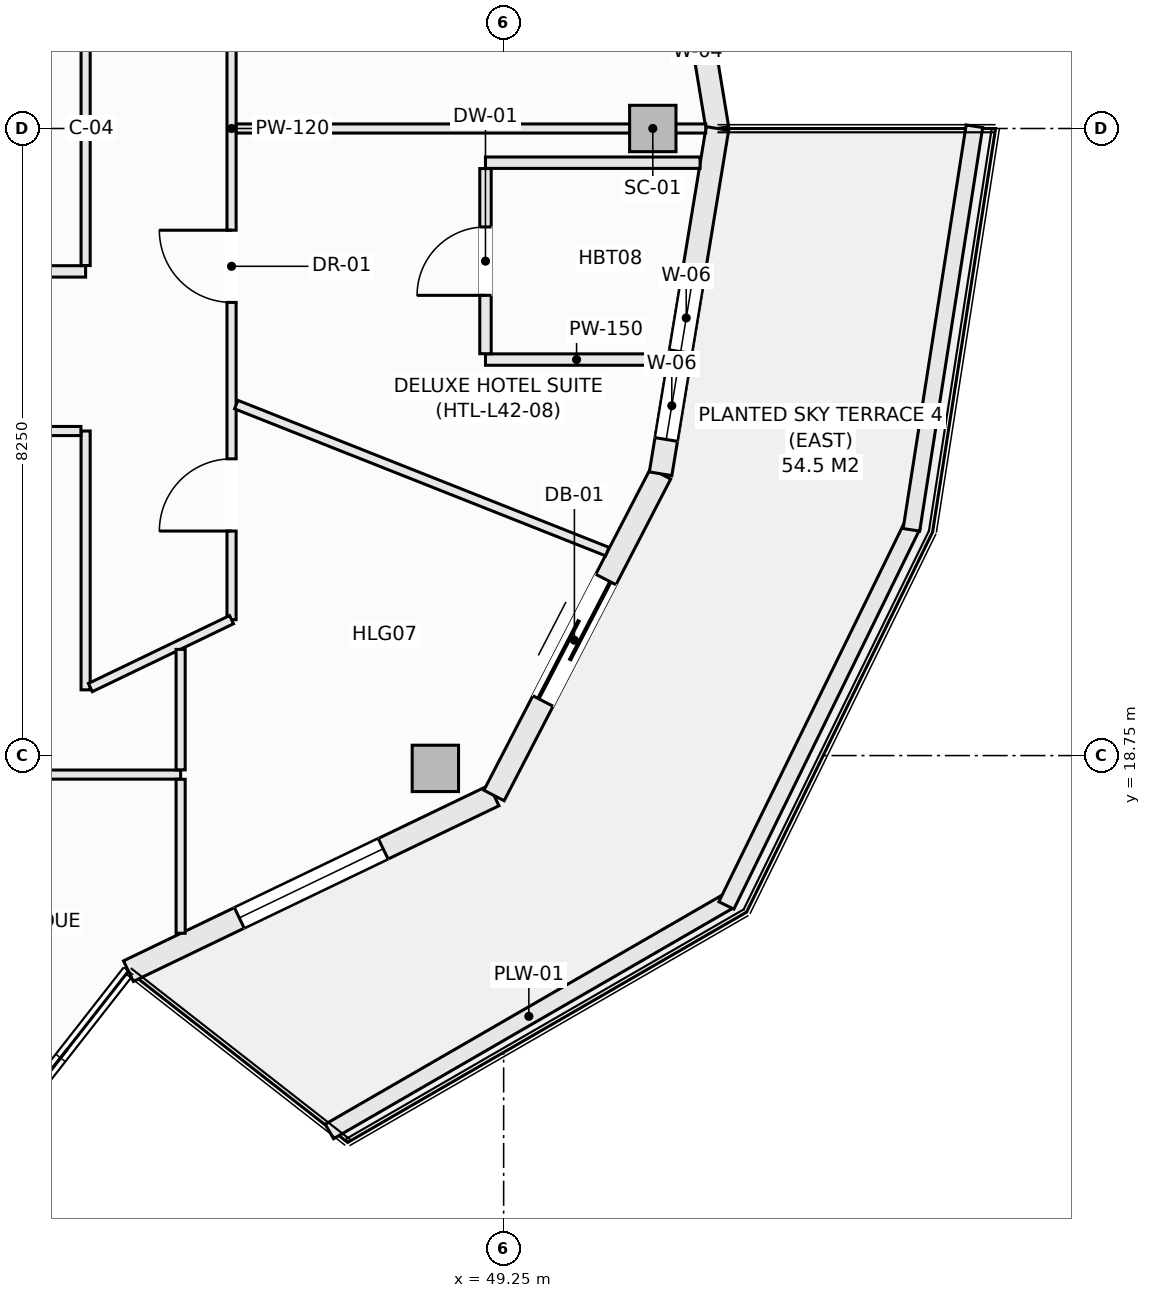
"""IFC4 building model, lengths in metres.
Left out: names, types, materials, properties, quantities, classifications, styles, units other than length and angle.
Written with IfcOpenShell. Run it as: python <this file> out.ifc"""

import sys

from ifc_helpers import new_model, si_unit, direction, frame, frame_2d, origin, origin_2d, place, context, subcontext, project, spatial, rectangle, hollow_rectangle, extrude, element, fill, save


model = new_model("IFC4")
c1 = context("Model", 3, precision=1e-05, world=origin(), true_north=direction((0.0, 1.0)))
c2 = subcontext(c1, "Body", "Model", "MODEL_VIEW")
j1 = project(units=[si_unit("LENGTHUNIT", "METRE"), si_unit("PLANEANGLEUNIT", "RADIAN")], contexts=[c1])
p1 = place(None, origin())
s1 = spatial("IfcSite", under=j1, at=p1, CompositionType="ELEMENT")
p2 = place(p1, origin())
s2 = spatial("IfcBuilding", under=s1, at=p2, CompositionType="ELEMENT")
p3 = place(p2, frame((0.0, 0.0, 163.1)))
s3 = spatial("IfcBuildingStorey", under=s2, at=p3, CompositionType="ELEMENT", Elevation=163.1)
for number, where, z_axis, x_axis in (
    (1, (51.212, 27.0, -0.27), (0.0, 0.0, 1.0), (1.0, 0.0, 0.0)),
    (2, (48.352, 18.581, -0.27), (0.0, 0.0, 1.0), (1.0, 0.0, 0.0)),
):
    element("IfcColumn", number, at=place(p3, frame(where, z_axis=z_axis, x_axis=x_axis)), inside=s3, PredefinedType="COLUMN", context=c2, shape_type="SweptSolid", body=[
        extrude(hollow_rectangle(XDim=0.61, YDim=0.61, WallThickness=0.025, at=origin_2d()), origin(), (0.0, 0.0, 1.0), 3.4),
    ])
p4 = place(p3, frame((51.315, 31.542, 0.0), z_axis=(0.0, 0.0, 1.0), x_axis=(0.162394765401, -0.986725868806, 0.0)))
e3 = element("IfcWall", 3, at=p4, inside=s3, PredefinedType="SOLIDWALL", context=c2, shape_type="SweptSolid", body=[
    extrude(rectangle(XDim=4.603, YDim=0.3, at=frame_2d((2.302, 0.0))), origin(), (0.0, 0.0, 1.0), 2.653),
])
p5 = place(p4, frame((0.958, 0.0, 0.74)))
e4 = element("IfcOpeningElement", 4, at=p5, cuts=e3, PredefinedType="OPENING", context=c2, shape_type="SweptSolid", body=[
    extrude(rectangle(XDim=1.2, YDim=1.7, at=frame_2d((0.6, 0.85))), frame((0.0, 0.16, 0.0), z_axis=(0.0, -1.0, 0.0), x_axis=(1.0, 0.0, 0.0)), (0.0, 0.0, 1.0), 0.32),
])
p6 = place(p4, frame((2.428, 0.0, 0.74)))
e5 = element("IfcOpeningElement", 5, at=p6, cuts=e3, PredefinedType="OPENING", context=c2, shape_type="SweptSolid", body=[
    extrude(rectangle(XDim=1.2, YDim=1.7, at=frame_2d((0.6, 0.85))), frame((0.0, 0.16, 0.0), z_axis=(0.0, -1.0, 0.0), x_axis=(1.0, 0.0, 0.0)), (0.0, 0.0, 1.0), 0.32),
])
p7 = place(p3, frame((44.313, 15.914, 0.0), z_axis=(0.0, 0.0, 1.0), x_axis=(0.901353070301, 0.433085029363, 0.0)))
e6 = element("IfcWall", 6, at=p7, inside=s3, PredefinedType="SOLIDWALL", context=c2, shape_type="SweptSolid", body=[
    extrude(rectangle(XDim=5.336, YDim=0.3, at=frame_2d((2.668, 0.0))), origin(), (0.0, 0.0, 1.0), 2.653),
])
p8 = place(p7, frame((1.618, 0.0, 0.74)))
e7 = element("IfcOpeningElement", 7, at=p8, cuts=e6, PredefinedType="OPENING", context=c2, shape_type="SweptSolid", body=[
    extrude(rectangle(XDim=2.1, YDim=1.7, at=frame_2d((1.05, 0.85))), frame((0.0, 0.16, 0.0), z_axis=(0.0, -1.0, 0.0), x_axis=(1.0, 0.0, 0.0)), (0.0, 0.0, 1.0), 0.32),
])
p9 = place(p3, frame((49.123, 18.225, 0.0), z_axis=(0.0, 0.0, 1.0), x_axis=(0.459810251451, 0.888017191647, 0.0)))
e8 = element("IfcWall", 8, at=p9, inside=s3, PredefinedType="SOLIDWALL", context=c2, shape_type="SweptSolid", body=[
    extrude(rectangle(XDim=4.766, YDim=0.3, at=frame_2d((2.383, 0.0))), origin(), (0.0, 0.0, 1.0), 2.653),
])
p10 = place(p9, frame((1.4, 0.0, 0.0)))
e9 = element("IfcOpeningElement", 9, at=p10, cuts=e8, PredefinedType="OPENING", context=c2, shape_type="SweptSolid", body=[
    extrude(rectangle(XDim=1.8, YDim=2.25, at=frame_2d((0.9, 1.125))), frame((0.0, 0.16, 0.0), z_axis=(0.0, -1.0, 0.0), x_axis=(1.0, 0.0, 0.0)), (0.0, 0.0, 1.0), 0.32),
])
p11 = place(p3, frame((51.315, 22.458, 0.0), z_axis=(0.0, 0.0, 1.0), x_axis=(0.162394765401, 0.986725868806, 0.0)))
e10 = element("IfcWall", 10, at=p11, inside=s3, PredefinedType="SOLIDWALL", context=c2, shape_type="SweptSolid", body=[
    extrude(rectangle(XDim=4.603, YDim=0.3, at=frame_2d((2.302, 0.0))), origin(), (0.0, 0.0, 1.0), 2.653),
])
p12 = place(p11, frame((0.457, 0.0, 0.72)))
e11 = element("IfcOpeningElement", 11, at=p12, cuts=e10, PredefinedType="OPENING", context=c2, shape_type="SweptSolid", body=[
    extrude(rectangle(XDim=0.9, YDim=1.65, at=frame_2d((0.45, 0.825))), frame((0.0, 0.16, 0.0), z_axis=(0.0, -1.0, 0.0), x_axis=(1.0, 0.0, 0.0)), (0.0, 0.0, 1.0), 0.32),
])
p13 = place(p11, frame((1.627, 0.0, 0.72)))
e12 = element("IfcOpeningElement", 12, at=p13, cuts=e10, PredefinedType="OPENING", context=c2, shape_type="SweptSolid", body=[
    extrude(rectangle(XDim=0.9, YDim=1.65, at=frame_2d((0.45, 0.825))), frame((0.0, 0.16, 0.0), z_axis=(0.0, -1.0, 0.0), x_axis=(1.0, 0.0, 0.0)), (0.0, 0.0, 1.0), 0.32),
])
p14 = place(p3, frame((46.958, 13.805, 0.0), z_axis=(0.0, 0.0, 1.0), x_axis=(0.866058128659, 0.499943314571, 0.0)))
e13 = element("IfcWall", 13, at=p14, inside=s3, PredefinedType="PARAPET", context=c2, shape_type="SweptSolid", body=[
    extrude(rectangle(XDim=6.06, YDim=0.22, at=frame_2d((3.03, 0.0))), origin(), (0.0, 0.0, 1.0), 0.52),
])
p15 = place(p3, frame((52.18, 16.779, 0.0), z_axis=(0.0, 0.0, 1.0), x_axis=(0.439637174641, 0.898175458735, 0.0)))
e14 = element("IfcWall", 14, at=p15, inside=s3, PredefinedType="PARAPET", context=c2, shape_type="SweptSolid", body=[
    extrude(rectangle(XDim=5.567, YDim=0.22, at=frame_2d((2.784, 0.0))), origin(), (0.0, 0.0, 1.0), 0.52),
])
p16 = place(p3, frame((54.615, 21.72, 0.0), z_axis=(0.0, 0.0, 1.0), x_axis=(0.154245214003, 0.988032597619, 0.0)))
e15 = element("IfcWall", 15, at=p16, inside=s3, PredefinedType="PARAPET", context=c2, shape_type="SweptSolid", body=[
    extrude(rectangle(XDim=5.374, YDim=0.22, at=frame_2d((2.687, 0.0))), origin(), (0.0, 0.0, 1.0), 0.52),
])
p17 = place(p3, frame((49.011, 23.96, 0.0), z_axis=(0.0, 0.0, 1.0), x_axis=(1.0, 0.0, 0.0)))
e16 = element("IfcWall", 16, at=p17, inside=s3, PredefinedType="PARTITIONING", context=c2, shape_type="SweptSolid", body=[
    extrude(rectangle(XDim=2.397, YDim=0.15, at=frame_2d((1.199, 0.0))), origin(), (0.0, 0.0, 1.0), 3.13),
])
p18 = place(p3, frame((29.78, 25.12, 0.0), z_axis=(0.0, 0.0, 1.0), x_axis=(1.0, 0.0, 0.0)))
e17 = element("IfcWall", 17, at=p18, inside=s3, PredefinedType="PARTITIONING", context=c2, shape_type="SweptSolid", body=[
    extrude(rectangle(XDim=13.97, YDim=0.15, at=frame_2d((6.985, 0.0))), origin(), (0.0, 0.0, 1.0), 3.13),
])
p19 = place(p18, frame((3.14, 0.0, 0.0)))
e18 = element("IfcOpeningElement", 18, at=p19, cuts=e17, PredefinedType="OPENING", context=c2, shape_type="SweptSolid", body=[
    extrude(rectangle(XDim=0.95, YDim=2.1, at=frame_2d((0.475, 1.05))), frame((0.0, 0.085, 0.0), z_axis=(0.0, -1.0, 0.0), x_axis=(1.0, 0.0, 0.0)), (0.0, 0.0, 1.0), 0.17),
])
p20 = place(p18, frame((7.445, 0.0, 0.0)))
e19 = element("IfcOpeningElement", 19, at=p20, cuts=e17, PredefinedType="OPENING", context=c2, shape_type="SweptSolid", body=[
    extrude(rectangle(XDim=0.95, YDim=2.1, at=frame_2d((0.475, 1.05))), frame((0.0, 0.085, 0.0), z_axis=(0.0, -1.0, 0.0), x_axis=(1.0, 0.0, 0.0)), (0.0, 0.0, 1.0), 0.17),
])
p21 = place(p18, frame((10.815, 0.0, 0.0)))
e20 = element("IfcOpeningElement", 20, at=p21, cuts=e17, PredefinedType="OPENING", context=c2, shape_type="SweptSolid", body=[
    extrude(rectangle(XDim=0.95, YDim=2.1, at=frame_2d((0.475, 1.05))), frame((0.0, 0.085, 0.0), z_axis=(0.0, -1.0, 0.0), x_axis=(1.0, 0.0, 0.0)), (0.0, 0.0, 1.0), 0.17),
])
p22 = place(p3, frame((43.75, 19.615, 0.0), z_axis=(0.0, 0.0, 1.0), x_axis=(0.0, 1.0, 0.0)))
e21 = element("IfcWall", 21, at=p22, inside=s3, PredefinedType="PARTITIONING", context=c2, shape_type="SweptSolid", body=[
    extrude(rectangle(XDim=3.405, YDim=0.12, at=frame_2d((1.703, 0.0))), origin(), (0.0, 0.0, 1.0), 3.13),
])
p23 = place(p3, frame((43.75, 25.197, 0.0), z_axis=(0.0, 0.0, 1.0), x_axis=(0.0, 1.0, 0.0)))
e22 = element("IfcWall", 22, at=p23, inside=s3, PredefinedType="PARTITIONING", context=c2, shape_type="SweptSolid", body=[
    extrude(rectangle(XDim=3.646, YDim=0.12, at=frame_2d((1.823, 0.0))), origin(), (0.0, 0.0, 1.0), 3.13),
])
p24 = place(p3, frame((45.67, 20.538, 0.0), z_axis=(0.0, 0.0, 1.0), x_axis=(0.0, 1.0, 0.0)))
e23 = element("IfcWall", 23, at=p24, inside=s3, PredefinedType="PARTITIONING", context=c2, shape_type="SweptSolid", body=[
    extrude(rectangle(XDim=12.924, YDim=0.12, at=frame_2d((6.462, 0.0))), origin(), (0.0, 0.0, 1.0), 3.13),
])
p25 = place(p24, frame((1.166, 0.0, 0.0)))
e24 = element("IfcOpeningElement", 24, at=p25, cuts=e23, PredefinedType="OPENING", context=c2, shape_type="SweptSolid", body=[
    extrude(rectangle(XDim=0.95, YDim=2.1, at=frame_2d((0.475, 1.05))), frame((0.0, 0.07, 0.0), z_axis=(0.0, -1.0, 0.0), x_axis=(1.0, 0.0, 0.0)), (0.0, 0.0, 1.0), 0.14),
])
p26 = place(p24, frame((4.174, 0.0, 0.0)))
e25 = element("IfcOpeningElement", 25, at=p26, cuts=e23, PredefinedType="OPENING", context=c2, shape_type="SweptSolid", body=[
    extrude(rectangle(XDim=0.95, YDim=2.1, at=frame_2d((0.475, 1.05))), frame((0.0, 0.07, 0.0), z_axis=(0.0, -1.0, 0.0), x_axis=(1.0, 0.0, 0.0)), (0.0, 0.0, 1.0), 0.14),
])
p27 = place(p24, frame((7.8, 0.0, 0.0)))
e26 = element("IfcOpeningElement", 26, at=p27, cuts=e23, PredefinedType="OPENING", context=c2, shape_type="SweptSolid", body=[
    extrude(rectangle(XDim=0.95, YDim=2.1, at=frame_2d((0.475, 1.05))), frame((0.0, 0.07, 0.0), z_axis=(0.0, -1.0, 0.0), x_axis=(1.0, 0.0, 0.0)), (0.0, 0.0, 1.0), 0.14),
])
p28 = place(p24, frame((10.808, 0.0, 0.0)))
e27 = element("IfcOpeningElement", 27, at=p28, cuts=e23, PredefinedType="OPENING", context=c2, shape_type="SweptSolid", body=[
    extrude(rectangle(XDim=0.95, YDim=2.1, at=frame_2d((0.475, 1.05))), frame((0.0, 0.07, 0.0), z_axis=(0.0, -1.0, 0.0), x_axis=(1.0, 0.0, 0.0)), (0.0, 0.0, 1.0), 0.14),
])
p29 = place(p3, frame((43.812, 19.645, 0.0), z_axis=(0.0, 0.0, 1.0), x_axis=(0.901236415331, 0.433327732417, 0.0)))
e28 = element("IfcWall", 28, at=p29, inside=s3, PredefinedType="PARTITIONING", context=c2, shape_type="SweptSolid", body=[
    extrude(rectangle(XDim=2.062, YDim=0.12, at=frame_2d((1.031, 0.0))), origin(), (0.0, 0.0, 1.0), 3.13),
])
p30 = place(p3, frame((39.0, 23.02, 0.0), z_axis=(0.0, 0.0, 1.0), x_axis=(1.0, 0.0, 0.0)))
e29 = element("IfcWall", 29, at=p30, inside=s3, PredefinedType="PARTITIONING", context=c2, shape_type="SweptSolid", body=[
    extrude(rectangle(XDim=4.688, YDim=0.12, at=frame_2d((2.344, 0.0))), origin(), (0.0, 0.0, 1.0), 3.13),
])
p31 = place(p30, frame((0.609, 0.0, 0.0)))
e30 = element("IfcOpeningElement", 30, at=p31, cuts=e29, PredefinedType="OPENING", context=c2, shape_type="SweptSolid", body=[
    extrude(rectangle(XDim=0.95, YDim=2.1, at=frame_2d((0.475, 1.05))), frame((0.0, 0.07, 0.0), z_axis=(0.0, -1.0, 0.0), x_axis=(1.0, 0.0, 0.0)), (0.0, 0.0, 1.0), 0.14),
])
p32 = place(p3, frame((45.732, 27.0, 0.0), z_axis=(0.0, 0.0, 1.0), x_axis=(1.0, 0.0, 0.0)))
e31 = element("IfcWall", 31, at=p32, inside=s3, PredefinedType="PARTITIONING", context=c2, shape_type="SweptSolid", body=[
    extrude(rectangle(XDim=6.177, YDim=0.12, at=frame_2d((3.088, 0.0))), origin(), (0.0, 0.0, 1.0), 2.505),
])
p33 = place(p3, frame((39.02, 18.5, 0.0), z_axis=(0.0, 0.0, 1.0), x_axis=(1.0, 0.0, 0.0)))
e32 = element("IfcWall", 32, at=p33, inside=s3, PredefinedType="PARTITIONING", context=c2, shape_type="SweptSolid", body=[
    extrude(rectangle(XDim=5.98, YDim=0.12, at=frame_2d((2.99, 0.0))), origin(), (0.0, 0.0, 1.0), 2.812),
])
p34 = place(p3, frame((45.0, 16.413, 0.0), z_axis=(0.0, 0.0, 1.0), x_axis=(0.0, 1.0, 0.0)))
e33 = element("IfcWall", 33, at=p34, inside=s3, PredefinedType="PARTITIONING", context=c2, shape_type="SweptSolid", body=[
    extrude(rectangle(XDim=2.025, YDim=0.12, at=frame_2d((1.013, 0.0))), origin(), (0.0, 0.0, 1.0), 3.13),
])
p35 = place(p3, frame((45.0, 18.562, 0.0), z_axis=(0.0, 0.0, 1.0), x_axis=(0.0, 1.0, 0.0)))
e34 = element("IfcWall", 34, at=p35, inside=s3, PredefinedType="PARTITIONING", context=c2, shape_type="SweptSolid", body=[
    extrude(rectangle(XDim=1.585, YDim=0.12, at=frame_2d((0.792, 0.0))), origin(), (0.0, 0.0, 1.0), 3.13),
])
p36 = place(p3, frame((45.732, 23.367, 0.0), z_axis=(0.0, 0.0, 1.0), x_axis=(0.929706134606, -0.368302190158, 0.0)))
e35 = element("IfcWall", 35, at=p36, inside=s3, PredefinedType="PARTITIONING", context=c2, shape_type="SweptSolid", body=[
    extrude(rectangle(XDim=5.251, YDim=0.12, at=frame_2d((2.625, 0.0))), origin(), (0.0, 0.0, 1.0), 3.13),
])
p37 = place(p3, frame((49.011, 26.55, 0.0), z_axis=(0.0, 0.0, 1.0), x_axis=(1.0, 0.0, 0.0)))
e36 = element("IfcWall", 36, at=p37, inside=s3, PredefinedType="PARTITIONING", context=c2, shape_type="SweptSolid", body=[
    extrude(rectangle(XDim=2.823, YDim=0.15, at=frame_2d((1.412, 0.0))), origin(), (0.0, 0.0, 1.0), 3.13),
])
p38 = place(p3, frame((49.011, 24.037, 0.0), z_axis=(0.0, 0.0, 1.0), x_axis=(0.0, 1.0, 0.0)))
e37 = element("IfcWall", 37, at=p38, inside=s3, PredefinedType="PARTITIONING", context=c2, shape_type="SweptSolid", body=[
    extrude(rectangle(XDim=2.436, YDim=0.15, at=frame_2d((1.218, 0.0))), origin(), (0.0, 0.0, 1.0), 3.13),
])
p39 = place(p38, frame((0.768, 0.0, 0.0)))
e38 = element("IfcOpeningElement", 38, at=p39, cuts=e37, PredefinedType="OPENING", context=c2, shape_type="SweptSolid", body=[
    extrude(rectangle(XDim=0.9, YDim=2.1, at=frame_2d((0.45, 1.05))), frame((0.0, 0.085, 0.0), z_axis=(0.0, -1.0, 0.0), x_axis=(1.0, 0.0, 0.0)), (0.0, 0.0, 1.0), 0.17),
])
p40 = place(p8, origin())
e39 = element("IfcWindow", 39, at=p40, inside=s3, PartitioningType="SINGLE_PANEL", PredefinedType="WINDOW", context=c2, shape_type="SweptSolid", body=[
    extrude(rectangle(XDim=2.1, YDim=1.7, at=frame_2d((1.05, 0.85))), frame((0.0, 0.03, 0.0), z_axis=(0.0, -1.0, 0.0), x_axis=(1.0, 0.0, 0.0)), (0.0, 0.0, 1.0), 0.06),
])
fill(e7, e39)
p41 = place(p10, frame((1.8, 0.0, 0.0), z_axis=(0.0, 0.0, 1.0), x_axis=(-1.0, 0.0, 0.0)))
e40 = element("IfcDoor", 40, at=p41, inside=s3, OperationType="SLIDING_TO_LEFT", PredefinedType="DOOR", context=c2, shape_type="SweptSolid", body=[
    extrude(rectangle(XDim=1.8, YDim=2.25, at=frame_2d((0.9, 1.125))), frame((0.0, 0.025, 0.0), z_axis=(0.0, -1.0, 0.0), x_axis=(1.0, 0.0, 0.0)), (0.0, 0.0, 1.0), 0.05),
])
fill(e9, e40)
p42 = place(p12, origin())
e41 = element("IfcWindow", 41, at=p42, inside=s3, PartitioningType="SINGLE_PANEL", PredefinedType="WINDOW", context=c2, shape_type="SweptSolid", body=[
    extrude(rectangle(XDim=0.9, YDim=1.65, at=frame_2d((0.45, 0.825))), frame((0.0, 0.03, 0.0), z_axis=(0.0, -1.0, 0.0), x_axis=(1.0, 0.0, 0.0)), (0.0, 0.0, 1.0), 0.06),
])
fill(e11, e41)
p43 = place(p25, origin())
e42 = element("IfcDoor", 42, at=p43, inside=s3, OperationType="SINGLE_SWING_LEFT", PredefinedType="DOOR", context=c2, shape_type="SweptSolid", body=[
    extrude(rectangle(XDim=0.95, YDim=2.1, at=frame_2d((0.475, 1.05))), frame((0.0, 0.025, 0.0), z_axis=(0.0, -1.0, 0.0), x_axis=(1.0, 0.0, 0.0)), (0.0, 0.0, 1.0), 0.05),
])
fill(e24, e42)
p44 = place(p26, origin())
e43 = element("IfcDoor", 43, at=p44, inside=s3, OperationType="SINGLE_SWING_RIGHT", PredefinedType="DOOR", context=c2, shape_type="SweptSolid", body=[
    extrude(rectangle(XDim=0.95, YDim=2.1, at=frame_2d((0.475, 1.05))), frame((0.0, 0.025, 0.0), z_axis=(0.0, -1.0, 0.0), x_axis=(1.0, 0.0, 0.0)), (0.0, 0.0, 1.0), 0.05),
])
fill(e25, e43)
p45 = place(p39, origin())
e44 = element("IfcDoor", 44, at=p45, inside=s3, OperationType="SINGLE_SWING_LEFT", PredefinedType="DOOR", context=c2, shape_type="SweptSolid", body=[
    extrude(rectangle(XDim=0.9, YDim=2.1, at=frame_2d((0.45, 1.05))), frame((0.0, 0.025, 0.0), z_axis=(0.0, -1.0, 0.0), x_axis=(1.0, 0.0, 0.0)), (0.0, 0.0, 1.0), 0.05),
])
fill(e38, e44)
p46 = place(p6, origin())
e45 = element("IfcWindow", 45, at=p46, inside=s3, PartitioningType="SINGLE_PANEL", PredefinedType="WINDOW", context=c2, shape_type="SweptSolid", body=[
    extrude(rectangle(XDim=1.2, YDim=1.7, at=frame_2d((0.6, 0.85))), frame((0.0, 0.03, 0.0), z_axis=(0.0, -1.0, 0.0), x_axis=(1.0, 0.0, 0.0)), (0.0, 0.0, 1.0), 0.06),
])
fill(e5, e45)
p47 = place(p13, origin())
e46 = element("IfcWindow", 46, at=p47, inside=s3, PartitioningType="SINGLE_PANEL", PredefinedType="WINDOW", context=c2, shape_type="SweptSolid", body=[
    extrude(rectangle(XDim=0.9, YDim=1.65, at=frame_2d((0.45, 0.825))), frame((0.0, 0.03, 0.0), z_axis=(0.0, -1.0, 0.0), x_axis=(1.0, 0.0, 0.0)), (0.0, 0.0, 1.0), 0.06),
])
fill(e12, e46)
save(model, sys.argv[1])
